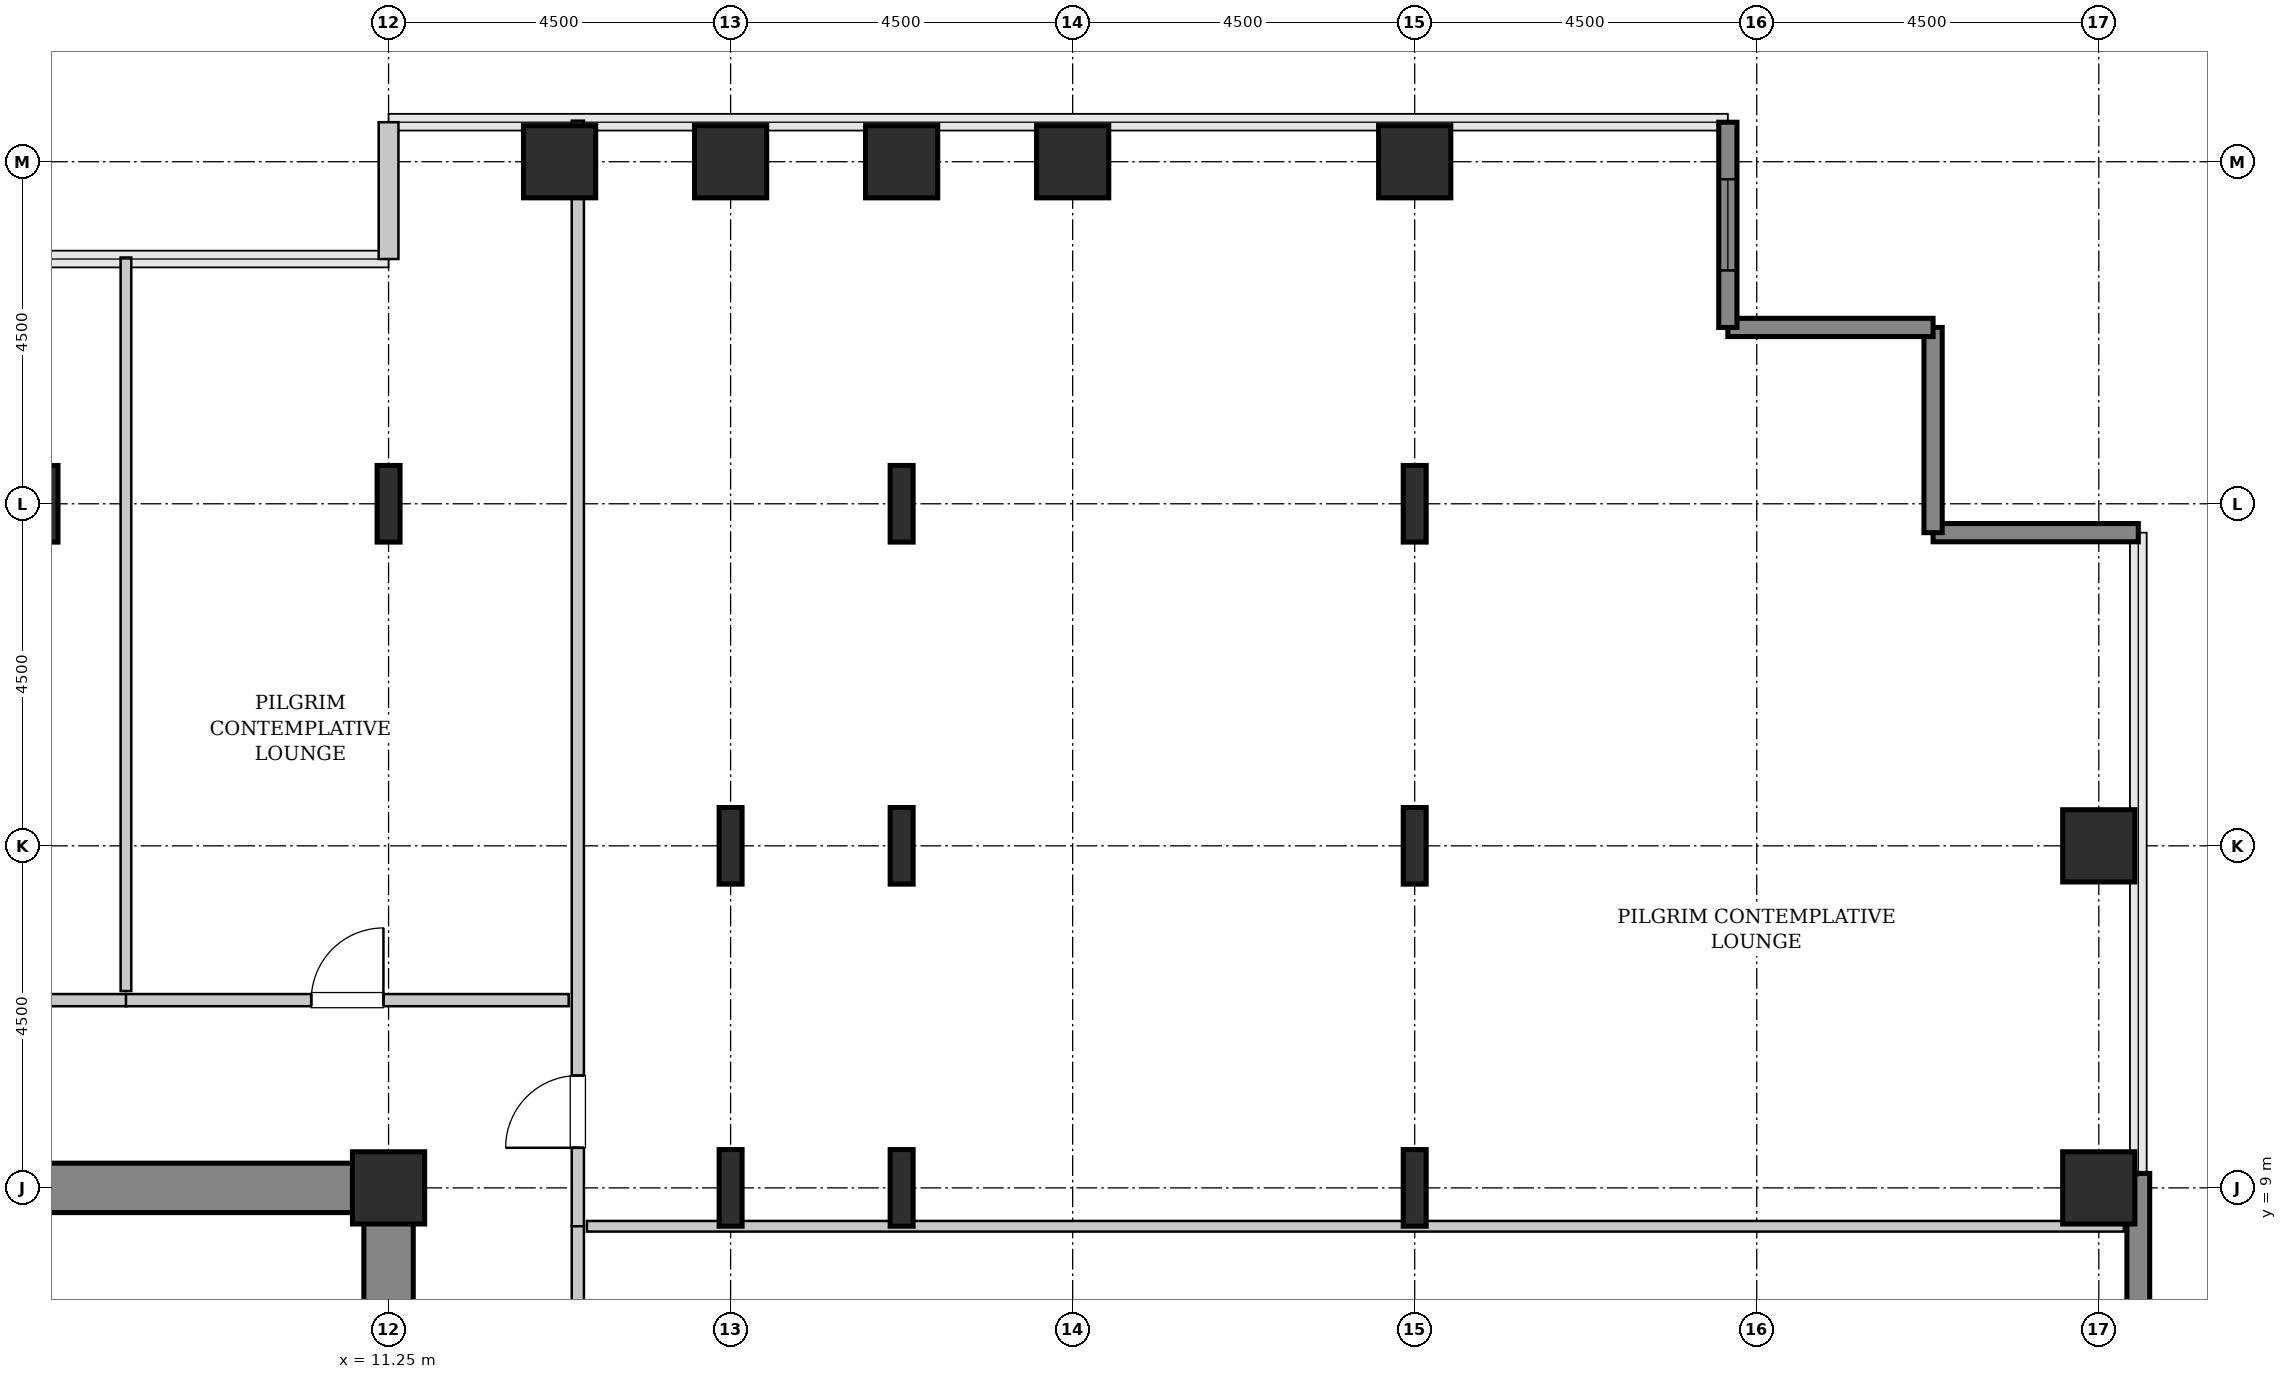
"""IFC4 building model, lengths in metres.
Left out: names, types, materials, properties, quantities, classifications, styles, units other than length and angle.
Written with IfcOpenShell. Run it as: python <this file> out.ifc"""

import sys

from ifc_helpers import new_model, si_unit, direction, frame, frame_2d, origin, origin_2d, place, context, subcontext, project, spatial, rectangle, hollow_rectangle, i_section, extrude, source, transform, mapped, element, fill, save


model = new_model("IFC4")
c1 = context("Model", 3, precision=1e-05, world=origin(), true_north=direction((0.0, 1.0)))
c2 = subcontext(c1, "Body", "Model", "MODEL_VIEW")
j1 = project(units=[si_unit("LENGTHUNIT", "METRE"), si_unit("PLANEANGLEUNIT", "RADIAN")], contexts=[c1])
p1 = place(None, origin())
s1 = spatial("IfcSite", under=j1, at=p1, CompositionType="ELEMENT")
p2 = place(p1, origin())
s2 = spatial("IfcBuilding", under=s1, at=p2, CompositionType="ELEMENT")
p3 = place(p2, frame((0.0, 0.0, 55.8)))
s3 = spatial("IfcBuildingStorey", under=s2, at=p3, CompositionType="ELEMENT", Elevation=55.8)
m1 = source(origin(), c2, "Body", "SweptSolid", [
    extrude(rectangle(XDim=10.025, YDim=0.65, at=frame_2d((5.012, 0.0))), origin(), (0.0, 0.0, 1.0), 3.8),
])
p4 = place(p3, frame((1.55, 9.0, 0.0), z_axis=(0.0, 0.0, 1.0), x_axis=(1.0, 0.0, 0.0)))
e1 = element("IfcWall", 1, at=p4, inside=s3, PredefinedType="SHEAR", context=c2, shape_type="MappedRepresentation", body=[
    mapped(m1, transform((0.0, 0.0, 0.0), x_axis=(1.0, 0.0, 0.0), y_axis=(0.0, 1.0, 0.0), z_axis=(0.0, 0.0, 1.0), scale=1.0)),
])
m2 = source(origin(), c2, "Body", "SweptSolid", [
    extrude(rectangle(XDim=7.325, YDim=0.65, at=frame_2d((3.663, 0.0))), origin(), (0.0, 0.0, 1.0), 3.8),
])
p5 = place(p3, frame((11.25, 1.35, 0.0), z_axis=(0.0, 0.0, 1.0), x_axis=(0.0, 1.0, 0.0)))
e2 = element("IfcWall", 2, at=p5, inside=s3, PredefinedType="SHEAR", context=c2, shape_type="MappedRepresentation", body=[
    mapped(m2, transform((0.0, 0.0, 0.0), x_axis=(1.0, 0.0, 0.0), y_axis=(0.0, 1.0, 0.0), z_axis=(0.0, 0.0, 1.0), scale=1.0)),
])
m3 = source(origin(), c2, "Body", "SweptSolid", [
    extrude(i_section(OverallWidth=0.302, OverallDepth=1.008, WebThickness=0.021, FlangeThickness=0.04, FilletRadius=0.03, at=origin_2d()), origin(), (0.0, 0.0, 1.0), 3.8),
])
p6 = place(p3, frame((6.75, 18.0, 0.0), z_axis=(0.0, 0.0, 1.0), x_axis=(1.0, 0.0, 0.0)))
e3 = element("IfcColumn", 3, at=p6, inside=s3, PredefinedType="COLUMN", context=c2, shape_type="MappedRepresentation", body=[
    mapped(m3, transform((0.0, 0.0, 0.0), x_axis=(1.0, 0.0, 0.0), y_axis=(0.0, 1.0, 0.0), z_axis=(0.0, 0.0, 1.0), scale=1.0)),
])
m4 = source(origin(), c2, "Body", "SweptSolid", [
    extrude(hollow_rectangle(XDim=0.95, YDim=0.95, WallThickness=0.045, InnerFilletRadius=0.045, OuterFilletRadius=0.09, at=origin_2d()), origin(), (0.0, 0.0, 1.0), 3.8),
])
p7 = place(p3, frame((11.25, 9.0, 0.0), z_axis=(0.0, 0.0, 1.0), x_axis=(1.0, 0.0, 0.0)))
e4 = element("IfcColumn", 4, at=p7, inside=s3, PredefinedType="COLUMN", context=c2, shape_type="MappedRepresentation", body=[
    mapped(m4, transform((0.0, 0.0, 0.0), x_axis=(1.0, 0.0, 0.0), y_axis=(0.0, 1.0, 0.0), z_axis=(0.0, 0.0, 1.0), scale=1.0)),
])
p8 = place(p3, frame((11.25, 18.0, 0.0), z_axis=(0.0, 0.0, 1.0), x_axis=(1.0, 0.0, 0.0)))
e5 = element("IfcColumn", 5, at=p8, inside=s3, PredefinedType="COLUMN", context=c2, shape_type="MappedRepresentation", body=[
    mapped(m3, transform((0.0, 0.0, 0.0), x_axis=(1.0, 0.0, 0.0), y_axis=(0.0, 1.0, 0.0), z_axis=(0.0, 0.0, 1.0), scale=1.0)),
])
m5 = source(origin(), c2, "Body", "SweptSolid", [
    extrude(hollow_rectangle(XDim=0.95, YDim=0.95, WallThickness=0.045, InnerFilletRadius=0.045, OuterFilletRadius=0.09, at=origin_2d()), origin(), (0.0, 0.0, 1.0), 3.8),
])
p9 = place(p3, frame((13.5, 22.5, 0.0), z_axis=(0.0, 0.0, 1.0), x_axis=(1.0, 0.0, 0.0)))
e6 = element("IfcColumn", 6, at=p9, inside=s3, PredefinedType="COLUMN", context=c2, shape_type="MappedRepresentation", body=[
    mapped(m5, transform((0.0, 0.0, 0.0), x_axis=(1.0, 0.0, 0.0), y_axis=(0.0, 1.0, 0.0), z_axis=(0.0, 0.0, 1.0), scale=1.0)),
])
for number, where, z_axis, x_axis in (
    (7, (15.75, 9.0, 0.0), (0.0, 0.0, 1.0), (1.0, 0.0, 0.0)),
    (8, (15.75, 13.5, 0.0), (0.0, 0.0, 1.0), (1.0, 0.0, 0.0)),
):
    element("IfcColumn", number, at=place(p3, frame(where, z_axis=z_axis, x_axis=x_axis)), inside=s3, PredefinedType="COLUMN", context=c2, shape_type="MappedRepresentation", body=[
        mapped(m3, transform((0.0, 0.0, 0.0), x_axis=(1.0, 0.0, 0.0), y_axis=(0.0, 1.0, 0.0), z_axis=(0.0, 0.0, 1.0), scale=1.0)),
    ])
p10 = place(p3, frame((15.75, 22.5, 0.0), z_axis=(0.0, 0.0, 1.0), x_axis=(1.0, 0.0, 0.0)))
e9 = element("IfcColumn", 9, at=p10, inside=s3, PredefinedType="COLUMN", context=c2, shape_type="MappedRepresentation", body=[
    mapped(m5, transform((0.0, 0.0, 0.0), x_axis=(1.0, 0.0, 0.0), y_axis=(0.0, 1.0, 0.0), z_axis=(0.0, 0.0, 1.0), scale=1.0)),
])
for number, where, z_axis, x_axis in (
    (10, (18.0, 9.0, 0.0), (0.0, 0.0, 1.0), (1.0, 0.0, 0.0)),
    (11, (18.0, 13.5, 0.0), (0.0, 0.0, 1.0), (1.0, 0.0, 0.0)),
    (12, (18.0, 18.0, 0.0), (0.0, 0.0, 1.0), (1.0, 0.0, 0.0)),
):
    element("IfcColumn", number, at=place(p3, frame(where, z_axis=z_axis, x_axis=x_axis)), inside=s3, PredefinedType="COLUMN", context=c2, shape_type="MappedRepresentation", body=[
        mapped(m3, transform((0.0, 0.0, 0.0), x_axis=(1.0, 0.0, 0.0), y_axis=(0.0, 1.0, 0.0), z_axis=(0.0, 0.0, 1.0), scale=1.0)),
    ])
for number, where, z_axis, x_axis in (
    (13, (18.0, 22.5, 0.0), (0.0, 0.0, 1.0), (1.0, 0.0, 0.0)),
    (14, (20.25, 22.5, 0.0), (0.0, 0.0, 1.0), (1.0, 0.0, 0.0)),
):
    element("IfcColumn", number, at=place(p3, frame(where, z_axis=z_axis, x_axis=x_axis)), inside=s3, PredefinedType="COLUMN", context=c2, shape_type="MappedRepresentation", body=[
        mapped(m5, transform((0.0, 0.0, 0.0), x_axis=(1.0, 0.0, 0.0), y_axis=(0.0, 1.0, 0.0), z_axis=(0.0, 0.0, 1.0), scale=1.0)),
    ])
for number, where, z_axis, x_axis in (
    (15, (24.75, 9.0, 0.0), (0.0, 0.0, 1.0), (1.0, 0.0, 0.0)),
    (16, (24.75, 13.5, 0.0), (0.0, 0.0, 1.0), (1.0, 0.0, 0.0)),
    (17, (24.75, 18.0, 0.0), (0.0, 0.0, 1.0), (1.0, 0.0, 0.0)),
):
    element("IfcColumn", number, at=place(p3, frame(where, z_axis=z_axis, x_axis=x_axis)), inside=s3, PredefinedType="COLUMN", context=c2, shape_type="MappedRepresentation", body=[
        mapped(m3, transform((0.0, 0.0, 0.0), x_axis=(1.0, 0.0, 0.0), y_axis=(0.0, 1.0, 0.0), z_axis=(0.0, 0.0, 1.0), scale=1.0)),
    ])
for number, where, z_axis, x_axis in (
    (18, (24.75, 22.5, 0.0), (0.0, 0.0, 1.0), (1.0, 0.0, 0.0)),
    (19, (33.75, 9.0, 0.0), (0.0, 0.0, 1.0), (1.0, 0.0, 0.0)),
    (20, (33.75, 13.5, 0.0), (0.0, 0.0, 1.0), (1.0, 0.0, 0.0)),
):
    element("IfcColumn", number, at=place(p3, frame(where, z_axis=z_axis, x_axis=x_axis)), inside=s3, PredefinedType="COLUMN", context=c2, shape_type="MappedRepresentation", body=[
        mapped(m5, transform((0.0, 0.0, 0.0), x_axis=(1.0, 0.0, 0.0), y_axis=(0.0, 1.0, 0.0), z_axis=(0.0, 0.0, 1.0), scale=1.0)),
    ])
m6 = source(origin(), c2, "Body", "SweptSolid", [
    extrude(rectangle(XDim=4.88, YDim=0.3, at=frame_2d((2.44, 0.0))), origin(), (0.0, 0.0, 1.0), 3.55),
])
p11 = place(p3, frame((34.27, 4.31, 0.0), z_axis=(0.0, 0.0, 1.0), x_axis=(0.0, 1.0, 0.0)))
e21 = element("IfcWall", 21, at=p11, inside=s3, PredefinedType="SHEAR", context=c2, shape_type="MappedRepresentation", body=[
    mapped(m6, transform((0.0, 0.0, 0.0), x_axis=(1.0, 0.0, 0.0), y_axis=(0.0, 1.0, 0.0), z_axis=(0.0, 0.0, 1.0), scale=1.0)),
])
m7 = source(origin(), c2, "Body", "SweptSolid", [
    extrude(rectangle(XDim=2.7, YDim=0.24, at=frame_2d((1.35, 0.0))), origin(), (0.0, 0.0, 1.0), 3.55),
])
for number, where, z_axis, x_axis in (
    (22, (34.27, 17.62, 0.0), (0.0, 0.0, 1.0), (-1.0, 0.0, 0.0)),
    (23, (31.57, 17.62, 0.0), (0.0, 0.0, 1.0), (0.0, 1.0, 0.0)),
    (24, (31.57, 20.32, 0.0), (0.0, 0.0, 1.0), (-1.0, 0.0, 0.0)),
):
    element("IfcWall", number, at=place(p3, frame(where, z_axis=z_axis, x_axis=x_axis)), inside=s3, PredefinedType="SHEAR", context=c2, shape_type="MappedRepresentation", body=[
        mapped(m7, transform((0.0, 0.0, 0.0), x_axis=(1.0, 0.0, 0.0), y_axis=(0.0, 1.0, 0.0), z_axis=(0.0, 0.0, 1.0), scale=1.0)),
    ])
p12 = place(p3, frame((28.87, 20.32, 0.0), z_axis=(0.0, 0.0, 1.0), x_axis=(0.0, 1.0, 0.0)))
e25 = element("IfcWall", 25, at=p12, inside=s3, PredefinedType="SHEAR", context=c2, shape_type="MappedRepresentation", body=[
    mapped(m7, transform((0.0, 0.0, 0.0), x_axis=(1.0, 0.0, 0.0), y_axis=(0.0, 1.0, 0.0), z_axis=(0.0, 0.0, 1.0), scale=1.0)),
])
p13 = place(p12, frame((0.75, 0.0, 0.85)))
e26 = element("IfcOpeningElement", 26, at=p13, cuts=e25, PredefinedType="OPENING", context=c2, shape_type="SweptSolid", body=[
    extrude(rectangle(XDim=1.2, YDim=1.8, at=frame_2d((0.6, 0.9))), frame((0.0, 0.13, 0.0), z_axis=(0.0, -1.0, 0.0), x_axis=(1.0, 0.0, 0.0)), (0.0, 0.0, 1.0), 0.26),
])
m8 = source(origin(), c2, "Body", "SweptSolid", [
    extrude(rectangle(XDim=1.8, YDim=0.26, at=frame_2d((0.9, 0.0))), origin(), (0.0, 0.0, 1.0), 3.55),
])
p14 = place(p3, frame((11.25, 23.02, 0.0), z_axis=(0.0, 0.0, 1.0), x_axis=(0.0, -1.0, 0.0)))
e27 = element("IfcWall", 27, at=p14, inside=s3, PredefinedType="SOLIDWALL", context=c2, shape_type="MappedRepresentation", body=[
    mapped(m8, transform((0.0, 0.0, 0.0), x_axis=(1.0, 0.0, 0.0), y_axis=(0.0, 1.0, 0.0), z_axis=(0.0, 0.0, 1.0), scale=1.0)),
])
m9 = source(origin(), c2, "Body", "SweptSolid", [
    extrude(rectangle(XDim=3.31, YDim=0.16, at=frame_2d((1.655, 0.0))), origin(), (0.0, 0.0, 1.0), 3.535),
])
p15 = place(p3, frame((13.74, 5.195, 0.0), z_axis=(0.0, 0.0, 1.0), x_axis=(0.0, 1.0, 0.0)))
e28 = element("IfcWall", 28, at=p15, inside=s3, PredefinedType="PARTITIONING", context=c2, shape_type="MappedRepresentation", body=[
    mapped(m9, transform((0.0, 0.0, 0.0), x_axis=(1.0, 0.0, 0.0), y_axis=(0.0, 1.0, 0.0), z_axis=(0.0, 0.0, 1.0), scale=1.0)),
])
p16 = place(p15, frame((1.18, 0.0, 0.0)))
e29 = element("IfcOpeningElement", 29, at=p16, cuts=e28, PredefinedType="OPENING", context=c2, shape_type="SweptSolid", body=[
    extrude(rectangle(XDim=0.95, YDim=2.1, at=frame_2d((0.475, 1.05))), frame((0.0, 0.09, 0.0), z_axis=(0.0, -1.0, 0.0), x_axis=(1.0, 0.0, 0.0)), (0.0, 0.0, 1.0), 0.18),
])
m10 = source(origin(), c2, "Body", "SweptSolid", [
    extrude(rectangle(XDim=20.22, YDim=0.14, at=frame_2d((10.11, 0.0))), origin(), (0.0, 0.0, 1.0), 2.825),
])
p17 = place(p3, frame((13.86, 8.495, 0.0), z_axis=(0.0, 0.0, 1.0), x_axis=(1.0, 0.0, 0.0)))
e30 = element("IfcWall", 30, at=p17, inside=s3, PredefinedType="PARTITIONING", context=c2, shape_type="MappedRepresentation", body=[
    mapped(m10, transform((0.0, 0.0, 0.0), x_axis=(1.0, 0.0, 0.0), y_axis=(0.0, 1.0, 0.0), z_axis=(0.0, 0.0, 1.0), scale=1.0)),
])
m11 = source(origin(), c2, "Body", "SweptSolid", [
    extrude(rectangle(XDim=14.545, YDim=0.16, at=frame_2d((7.272, 0.0))), origin(), (0.0, 0.0, 1.0), 3.535),
])
p18 = place(p3, frame((13.74, 8.495, 0.0), z_axis=(0.0, 0.0, 1.0), x_axis=(0.0, 1.0, 0.0)))
e31 = element("IfcWall", 31, at=p18, inside=s3, PredefinedType="PARTITIONING", context=c2, shape_type="MappedRepresentation", body=[
    mapped(m11, transform((0.0, 0.0, 0.0), x_axis=(1.0, 0.0, 0.0), y_axis=(0.0, 1.0, 0.0), z_axis=(0.0, 0.0, 1.0), scale=1.0)),
])
p19 = place(p18, frame((1.032, 0.0, 0.0)))
e32 = element("IfcOpeningElement", 32, at=p19, cuts=e31, PredefinedType="OPENING", context=c2, shape_type="SweptSolid", body=[
    extrude(rectangle(XDim=0.95, YDim=2.1, at=frame_2d((0.475, 1.05))), frame((0.0, 0.09, 0.0), z_axis=(0.0, -1.0, 0.0), x_axis=(1.0, 0.0, 0.0)), (0.0, 0.0, 1.0), 0.18),
])
m12 = source(origin(), c2, "Body", "SweptSolid", [
    extrude(rectangle(XDim=6.01, YDim=0.16, at=frame_2d((3.005, 0.0))), origin(), (0.0, 0.0, 1.0), 3.535),
])
p20 = place(p3, frame((1.795, 11.47, 0.0), z_axis=(0.0, 0.0, 1.0), x_axis=(1.0, 0.0, 0.0)))
e33 = element("IfcWall", 33, at=p20, inside=s3, PredefinedType="PARTITIONING", context=c2, shape_type="MappedRepresentation", body=[
    mapped(m12, transform((0.0, 0.0, 0.0), x_axis=(1.0, 0.0, 0.0), y_axis=(0.0, 1.0, 0.0), z_axis=(0.0, 0.0, 1.0), scale=1.0)),
])
p21 = place(p20, frame((2.53, 0.0, 0.0)))
e34 = element("IfcOpeningElement", 34, at=p21, cuts=e33, PredefinedType="OPENING", context=c2, shape_type="SweptSolid", body=[
    extrude(rectangle(XDim=0.95, YDim=2.1, at=frame_2d((0.475, 1.05))), frame((0.0, 0.09, 0.0), z_axis=(0.0, -1.0, 0.0), x_axis=(1.0, 0.0, 0.0)), (0.0, 0.0, 1.0), 0.18),
])
m13 = source(origin(), c2, "Body", "SweptSolid", [
    extrude(rectangle(XDim=9.65, YDim=0.14, at=frame_2d((4.825, 0.0))), origin(), (0.0, 0.0, 1.0), 3.535),
])
p22 = place(p3, frame((7.795, 11.59, 0.0), z_axis=(0.0, 0.0, 1.0), x_axis=(0.0, 1.0, 0.0)))
e35 = element("IfcWall", 35, at=p22, inside=s3, PredefinedType="PARTITIONING", context=c2, shape_type="MappedRepresentation", body=[
    mapped(m13, transform((0.0, 0.0, 0.0), x_axis=(1.0, 0.0, 0.0), y_axis=(0.0, 1.0, 0.0), z_axis=(0.0, 0.0, 1.0), scale=1.0)),
])
m14 = source(origin(), c2, "Body", "SweptSolid", [
    extrude(rectangle(XDim=5.825, YDim=0.16, at=frame_2d((2.913, 0.0))), origin(), (0.0, 0.0, 1.0), 3.535),
])
p23 = place(p3, frame((7.795, 11.47, 0.0), z_axis=(0.0, 0.0, 1.0), x_axis=(1.0, 0.0, 0.0)))
e36 = element("IfcWall", 36, at=p23, inside=s3, PredefinedType="PARTITIONING", context=c2, shape_type="MappedRepresentation", body=[
    mapped(m14, transform((0.0, 0.0, 0.0), x_axis=(1.0, 0.0, 0.0), y_axis=(0.0, 1.0, 0.0), z_axis=(0.0, 0.0, 1.0), scale=1.0)),
])
p24 = place(p23, frame((2.438, 0.0, 0.0)))
e37 = element("IfcOpeningElement", 37, at=p24, cuts=e36, PredefinedType="OPENING", context=c2, shape_type="SweptSolid", body=[
    extrude(rectangle(XDim=0.95, YDim=2.1, at=frame_2d((0.475, 1.05))), frame((0.0, 0.09, 0.0), z_axis=(0.0, -1.0, 0.0), x_axis=(1.0, 0.0, 0.0)), (0.0, 0.0, 1.0), 0.18),
])
m15 = source(origin(), c2, "Body", "SweptSolid", [
    extrude(rectangle(XDim=1.2, YDim=1.8, at=frame_2d((0.6, 0.9))), frame((0.0, 0.03, 0.0), z_axis=(0.0, -1.0, 0.0), x_axis=(1.0, 0.0, 0.0)), (0.0, 0.0, 1.0), 0.06),
])
p25 = place(p13, origin())
e38 = element("IfcWindow", 38, at=p25, inside=s3, PartitioningType="SINGLE_PANEL", PredefinedType="WINDOW", context=c2, shape_type="MappedRepresentation", body=[
    mapped(m15, transform((0.0, 0.0, 0.0), x_axis=(1.0, 0.0, 0.0), y_axis=(0.0, 1.0, 0.0), z_axis=(0.0, 0.0, 1.0), scale=1.0)),
])
fill(e26, e38)
m16 = source(origin(), c2, "Body", "SweptSolid", [
    extrude(rectangle(XDim=0.95, YDim=2.1, at=frame_2d((0.475, 1.05))), frame((0.0, 0.025, 0.0), z_axis=(0.0, -1.0, 0.0), x_axis=(1.0, 0.0, 0.0)), (0.0, 0.0, 1.0), 0.05),
])
p26 = place(p19, origin())
e39 = element("IfcDoor", 39, at=p26, inside=s3, OperationType="SINGLE_SWING_LEFT", PredefinedType="DOOR", context=c2, shape_type="MappedRepresentation", body=[
    mapped(m16, transform((0.0, 0.0, 0.0), x_axis=(1.0, 0.0, 0.0), y_axis=(0.0, 1.0, 0.0), z_axis=(0.0, 0.0, 1.0), scale=1.0)),
])
fill(e32, e39)
p27 = place(p24, origin())
e40 = element("IfcDoor", 40, at=p27, inside=s3, OperationType="SINGLE_SWING_RIGHT", PredefinedType="DOOR", context=c2, shape_type="MappedRepresentation", body=[
    mapped(m16, transform((0.0, 0.0, 0.0), x_axis=(1.0, 0.0, 0.0), y_axis=(0.0, 1.0, 0.0), z_axis=(0.0, 0.0, 1.0), scale=1.0)),
])
fill(e37, e40)
save(model, sys.argv[1])
